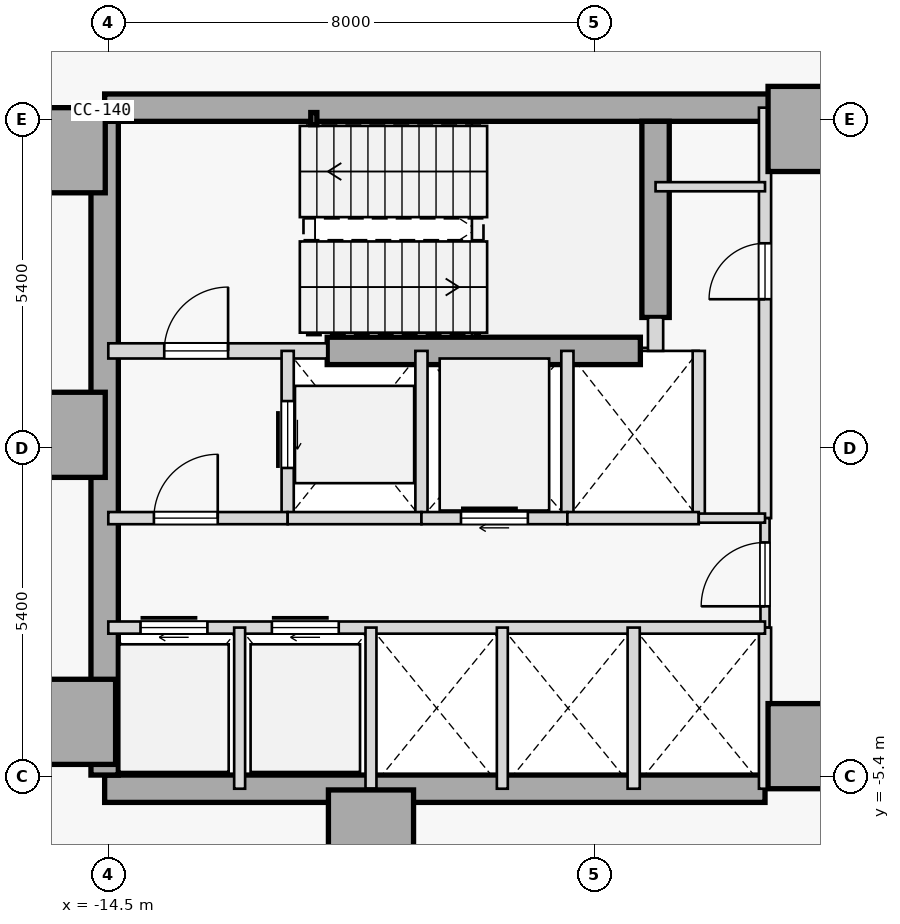
"""IFC4 building model, lengths in metres.
Left out: names, types, materials, properties, quantities, classifications, styles, units other than length and angle.
Written with IfcOpenShell. Run it as: python <this file> out.ifc"""

import sys

from ifc_helpers import new_model, si_unit, direction, frame, frame_2d, origin, origin_2d, place, context, subcontext, project, spatial, rectangle, hollow_rectangle, extrude, element, fill, save


model = new_model("IFC4")
c1 = context("Model", 3, precision=1e-05, world=origin(), true_north=direction((0.0, 1.0)))
c2 = subcontext(c1, "Body", "Model", "MODEL_VIEW")
j1 = project(units=[si_unit("LENGTHUNIT", "METRE"), si_unit("PLANEANGLEUNIT", "RADIAN")], contexts=[c1])
p1 = place(None, origin())
s1 = spatial("IfcSite", under=j1, at=p1, CompositionType="ELEMENT")
p2 = place(p1, origin())
s2 = spatial("IfcBuilding", under=s1, at=p2, CompositionType="ELEMENT")
p3 = place(p2, frame((0.0, 0.0, 71.2)))
s3 = spatial("IfcBuildingStorey", under=s2, at=p3, CompositionType="ELEMENT", Elevation=71.2)
for number, where, z_axis, x_axis in (
    (1, (-15.25, 4.9, 0.0), (0.0, 0.0, 1.0), (1.0, 0.0, 0.0)),
    (2, (-15.25, 0.22, 0.0), (0.0, 0.0, 1.0), (1.0, 0.0, 0.0)),
    (3, (-15.08, -4.5, 0.0), (0.0, 0.0, 1.0), (1.0, 0.0, 0.0)),
    (4, (-10.18, -6.32, 0.0), (0.0, 0.0, 1.0), (1.0, 0.0, 0.0)),
    (5, (-2.95, -4.9, 0.0), (0.0, 0.0, 1.0), (1.0, 0.0, 0.0)),
    (6, (-2.95, 5.25, 0.0), (0.0, 0.0, 1.0), (1.0, 0.0, 0.0)),
):
    element("IfcColumn", number, at=place(p3, frame(where, z_axis=z_axis, x_axis=x_axis)), inside=s3, PredefinedType="COLUMN", context=c2, shape_type="SweptSolid", body=[
        extrude(rectangle(XDim=1.4, YDim=1.4, at=origin_2d()), origin(), (0.0, 0.0, 1.0), 3.8),
    ])
p4 = place(p3, frame((-14.56, 5.6, 0.0), z_axis=(0.0, 0.0, 1.0), x_axis=(1.0, 0.0, 0.0)))
e7 = element("IfcWall", 7, at=p4, inside=s3, PredefinedType="SHEAR", context=c2, shape_type="SweptSolid", body=[
    extrude(rectangle(XDim=11.41, YDim=0.45, at=frame_2d((5.705, 0.0))), origin(), (0.0, 0.0, 1.0), 3.575),
])
p5 = place(p3, frame((-14.56, -5.6, 0.0), z_axis=(0.0, 0.0, 1.0), x_axis=(1.0, 0.0, 0.0)))
e8 = element("IfcWall", 8, at=p5, inside=s3, PredefinedType="SHEAR", context=c2, shape_type="SweptSolid", body=[
    extrude(rectangle(XDim=10.86, YDim=0.45, at=frame_2d((5.43, 0.0))), origin(), (0.0, 0.0, 1.0), 3.575),
])
p6 = place(p3, frame((-14.56, -5.375, 0.0), z_axis=(0.0, 0.0, 1.0), x_axis=(0.0, 1.0, 0.0)))
e9 = element("IfcWall", 9, at=p6, inside=s3, PredefinedType="SHEAR", context=c2, shape_type="SweptSolid", body=[
    extrude(rectangle(XDim=10.75, YDim=0.45, at=frame_2d((5.375, 0.0))), origin(), (0.0, 0.0, 1.0), 3.575),
])
p7 = place(p3, frame((-5.5, 2.15, 0.0), z_axis=(0.0, 0.0, 1.0), x_axis=(0.0, 1.0, 0.0)))
e10 = element("IfcWall", 10, at=p7, inside=s3, PredefinedType="SHEAR", context=c2, shape_type="SweptSolid", body=[
    extrude(rectangle(XDim=3.225, YDim=0.45, at=frame_2d((1.613, 0.0))), origin(), (0.0, 0.0, 1.0), 3.575),
])
p8 = place(p3, frame((-10.9, 1.6, 0.0), z_axis=(0.0, 0.0, 1.0), x_axis=(1.0, 0.0, 0.0)))
e11 = element("IfcWall", 11, at=p8, inside=s3, PredefinedType="SHEAR", context=c2, shape_type="SweptSolid", body=[
    extrude(rectangle(XDim=5.15, YDim=0.45, at=frame_2d((2.575, 0.0))), origin(), (0.0, 0.0, 1.0), 3.575),
])
p9 = place(p3, frame((-11.12, 5.42, 0.0), z_axis=(0.0, 0.0, 1.0), x_axis=(1.0, 0.0, 0.0)))
e12 = element("IfcColumn", 12, at=p9, inside=s3, PredefinedType="COLUMN", context=c2, shape_type="SweptSolid", body=[
    extrude(hollow_rectangle(XDim=0.1, YDim=0.2, WallThickness=0.008, at=origin_2d()), origin(), (0.0, 0.0, 1.0), 3.8),
])
p10 = place(p3, frame((-14.5, 1.6, 0.0), z_axis=(0.0, 0.0, 1.0), x_axis=(1.0, 0.0, 0.0)))
e13 = element("IfcWall", 13, at=p10, inside=s3, PredefinedType="STANDARD", context=c2, shape_type="SweptSolid", body=[
    extrude(rectangle(XDim=3.6, YDim=0.25, at=frame_2d((1.8, 0.0))), origin(), (0.0, 0.0, 1.0), 3.575),
])
p11 = place(p10, frame((0.92, 0.0, 0.0)))
e14 = element("IfcOpeningElement", 14, at=p11, cuts=e13, PredefinedType="OPENING", context=c2, shape_type="SweptSolid", body=[
    extrude(rectangle(XDim=1.05, YDim=2.15, at=frame_2d((0.525, 1.075))), frame((0.0, 0.135, 0.0), z_axis=(0.0, -1.0, 0.0), x_axis=(1.0, 0.0, 0.0)), (0.0, 0.0, 1.0), 0.27),
])
p12 = place(p3, frame((-5.5, 1.6, 0.0), z_axis=(0.0, 0.0, 1.0), x_axis=(0.0, 1.0, 0.0)))
e15 = element("IfcWall", 15, at=p12, inside=s3, PredefinedType="STANDARD", context=c2, shape_type="SweptSolid", body=[
    extrude(rectangle(XDim=0.55, YDim=0.25, at=frame_2d((0.275, 0.0))), origin(), (0.0, 0.0, 1.0), 3.575),
])
p13 = place(p3, frame((-3.7, -1.15, 0.0), z_axis=(0.0, 0.0, 1.0), x_axis=(0.0, 1.0, 0.0)))
e16 = element("IfcWall", 16, at=p13, inside=s3, PredefinedType="STANDARD", context=c2, shape_type="SweptSolid", body=[
    extrude(rectangle(XDim=6.75, YDim=0.2, at=frame_2d((3.375, 0.0))), origin(), (0.0, 0.0, 1.0), 3.575),
])
p14 = place(p13, frame((3.6, 0.0, 0.0)))
e17 = element("IfcOpeningElement", 17, at=p14, cuts=e16, PredefinedType="OPENING", context=c2, shape_type="SweptSolid", body=[
    extrude(rectangle(XDim=0.92, YDim=2.15, at=frame_2d((0.46, 1.075))), frame((0.0, 0.11, 0.0), z_axis=(0.0, -1.0, 0.0), x_axis=(1.0, 0.0, 0.0)), (0.0, 0.0, 1.0), 0.22),
])
p15 = place(p3, frame((-3.7, -2.95, 0.0), z_axis=(0.0, 0.0, 1.0), x_axis=(0.0, 1.0, 0.0)))
e18 = element("IfcWall", 18, at=p15, inside=s3, PredefinedType="PARTITIONING", context=c2, shape_type="SweptSolid", body=[
    extrude(rectangle(XDim=1.8, YDim=0.15, at=frame_2d((0.9, 0.0))), origin(), (0.0, 0.0, 1.0), 3.575),
])
p16 = place(p15, frame((0.35, 0.0, 0.0)))
e19 = element("IfcOpeningElement", 19, at=p16, cuts=e18, PredefinedType="OPENING", context=c2, shape_type="SweptSolid", body=[
    extrude(rectangle(XDim=1.05, YDim=2.18, at=frame_2d((0.525, 1.09))), frame((0.0, 0.085, 0.0), z_axis=(0.0, -1.0, 0.0), x_axis=(1.0, 0.0, 0.0)), (0.0, 0.0, 1.0), 0.17),
])
p17 = place(p3, frame((-3.7, -5.6, 0.0), z_axis=(0.0, 0.0, 1.0), x_axis=(0.0, 1.0, 0.0)))
e20 = element("IfcWall", 20, at=p17, inside=s3, PredefinedType="STANDARD", context=c2, shape_type="SweptSolid", body=[
    extrude(rectangle(XDim=2.65, YDim=0.2, at=frame_2d((1.325, 0.0))), origin(), (0.0, 0.0, 1.0), 3.575),
])
p18 = place(p3, frame((-11.55, -1.15, 0.0), z_axis=(0.0, 0.0, 1.0), x_axis=(0.0, 1.0, 0.0)))
e21 = element("IfcWall", 21, at=p18, inside=s3, PredefinedType="STANDARD", context=c2, shape_type="SweptSolid", body=[
    extrude(rectangle(XDim=2.75, YDim=0.2, at=frame_2d((1.375, 0.0))), origin(), (0.0, 0.0, 1.0), 3.575),
])
p19 = place(p18, frame((0.825, 0.0, 0.0)))
e22 = element("IfcOpeningElement", 22, at=p19, cuts=e21, PredefinedType="OPENING", context=c2, shape_type="SweptSolid", body=[
    extrude(rectangle(XDim=1.1, YDim=2.15, at=frame_2d((0.55, 1.075))), frame((0.0, 0.11, 0.0), z_axis=(0.0, -1.0, 0.0), x_axis=(1.0, 0.0, 0.0)), (0.0, 0.0, 1.0), 0.22),
])
p20 = place(p3, frame((-9.35, -1.15, 0.0), z_axis=(0.0, 0.0, 1.0), x_axis=(0.0, 1.0, 0.0)))
e23 = element("IfcWall", 23, at=p20, inside=s3, PredefinedType="STANDARD", context=c2, shape_type="SweptSolid", body=[
    extrude(rectangle(XDim=2.75, YDim=0.2, at=frame_2d((1.375, 0.0))), origin(), (0.0, 0.0, 1.0), 3.575),
])
p21 = place(p3, frame((-14.5, -1.15, 0.0), z_axis=(0.0, 0.0, 1.0), x_axis=(1.0, 0.0, 0.0)))
e24 = element("IfcWall", 24, at=p21, inside=s3, PredefinedType="STANDARD", context=c2, shape_type="SweptSolid", body=[
    extrude(rectangle(XDim=2.95, YDim=0.2, at=frame_2d((1.475, 0.0))), origin(), (0.0, 0.0, 1.0), 3.575),
])
p22 = place(p21, frame((0.75, 0.0, 0.0)))
e25 = element("IfcOpeningElement", 25, at=p22, cuts=e24, PredefinedType="OPENING", context=c2, shape_type="SweptSolid", body=[
    extrude(rectangle(XDim=1.05, YDim=2.18, at=frame_2d((0.525, 1.09))), frame((0.0, 0.11, 0.0), z_axis=(0.0, -1.0, 0.0), x_axis=(1.0, 0.0, 0.0)), (0.0, 0.0, 1.0), 0.22),
])
p23 = place(p3, frame((-11.55, -1.15, 0.0), z_axis=(0.0, 0.0, 1.0), x_axis=(1.0, 0.0, 0.0)))
e26 = element("IfcWall", 26, at=p23, inside=s3, PredefinedType="STANDARD", context=c2, shape_type="SweptSolid", body=[
    extrude(rectangle(XDim=2.2, YDim=0.2, at=frame_2d((1.1, 0.0))), origin(), (0.0, 0.0, 1.0), 3.575),
])
p24 = place(p3, frame((-6.95, -1.15, 0.0), z_axis=(0.0, 0.0, 1.0), x_axis=(0.0, 1.0, 0.0)))
e27 = element("IfcWall", 27, at=p24, inside=s3, PredefinedType="STANDARD", context=c2, shape_type="SweptSolid", body=[
    extrude(rectangle(XDim=2.75, YDim=0.2, at=frame_2d((1.375, 0.0))), origin(), (0.0, 0.0, 1.0), 3.575),
])
p25 = place(p3, frame((-9.35, -1.15, 0.0), z_axis=(0.0, 0.0, 1.0), x_axis=(1.0, 0.0, 0.0)))
e28 = element("IfcWall", 28, at=p25, inside=s3, PredefinedType="STANDARD", context=c2, shape_type="SweptSolid", body=[
    extrude(rectangle(XDim=2.4, YDim=0.2, at=frame_2d((1.2, 0.0))), origin(), (0.0, 0.0, 1.0), 3.575),
])
p26 = place(p25, frame((0.65, 0.0, 0.0)))
e29 = element("IfcOpeningElement", 29, at=p26, cuts=e28, PredefinedType="OPENING", context=c2, shape_type="SweptSolid", body=[
    extrude(rectangle(XDim=1.1, YDim=2.15, at=frame_2d((0.55, 1.075))), frame((0.0, 0.11, 0.0), z_axis=(0.0, -1.0, 0.0), x_axis=(1.0, 0.0, 0.0)), (0.0, 0.0, 1.0), 0.22),
])
p27 = place(p3, frame((-4.79, -1.15, 0.0), z_axis=(0.0, 0.0, 1.0), x_axis=(0.0, 1.0, 0.0)))
e30 = element("IfcWall", 30, at=p27, inside=s3, PredefinedType="STANDARD", context=c2, shape_type="SweptSolid", body=[
    extrude(rectangle(XDim=2.75, YDim=0.2, at=frame_2d((1.375, 0.0))), origin(), (0.0, 0.0, 1.0), 3.575),
])
p28 = place(p3, frame((-6.95, -1.15, 0.0), z_axis=(0.0, 0.0, 1.0), x_axis=(1.0, 0.0, 0.0)))
e31 = element("IfcWall", 31, at=p28, inside=s3, PredefinedType="STANDARD", context=c2, shape_type="SweptSolid", body=[
    extrude(rectangle(XDim=2.16, YDim=0.2, at=frame_2d((1.08, 0.0))), origin(), (0.0, 0.0, 1.0), 3.575),
])
p29 = place(p3, frame((-4.79, -1.15, 0.0), z_axis=(0.0, 0.0, 1.0), x_axis=(1.0, 0.0, 0.0)))
e32 = element("IfcWall", 32, at=p29, inside=s3, PredefinedType="PARTITIONING", context=c2, shape_type="SweptSolid", body=[
    extrude(rectangle(XDim=1.09, YDim=0.15, at=frame_2d((0.545, 0.0))), origin(), (0.0, 0.0, 1.0), 3.575),
])
p30 = place(p3, frame((-14.5, -2.95, 0.0), z_axis=(0.0, 0.0, 1.0), x_axis=(1.0, 0.0, 0.0)))
e33 = element("IfcWall", 33, at=p30, inside=s3, PredefinedType="STANDARD", context=c2, shape_type="SweptSolid", body=[
    extrude(rectangle(XDim=10.8, YDim=0.2, at=frame_2d((5.4, 0.0))), origin(), (0.0, 0.0, 1.0), 3.575),
])
p31 = place(p30, frame((0.53, 0.0, 0.0)))
e34 = element("IfcOpeningElement", 34, at=p31, cuts=e33, PredefinedType="OPENING", context=c2, shape_type="SweptSolid", body=[
    extrude(rectangle(XDim=1.1, YDim=2.15, at=frame_2d((0.55, 1.075))), frame((0.0, 0.11, 0.0), z_axis=(0.0, -1.0, 0.0), x_axis=(1.0, 0.0, 0.0)), (0.0, 0.0, 1.0), 0.22),
])
p32 = place(p30, frame((2.69, 0.0, 0.0)))
e35 = element("IfcOpeningElement", 35, at=p32, cuts=e33, PredefinedType="OPENING", context=c2, shape_type="SweptSolid", body=[
    extrude(rectangle(XDim=1.1, YDim=2.15, at=frame_2d((0.55, 1.075))), frame((0.0, 0.11, 0.0), z_axis=(0.0, -1.0, 0.0), x_axis=(1.0, 0.0, 0.0)), (0.0, 0.0, 1.0), 0.22),
])
p33 = place(p3, frame((-5.86, -5.6, 0.0), z_axis=(0.0, 0.0, 1.0), x_axis=(0.0, 1.0, 0.0)))
e36 = element("IfcWall", 36, at=p33, inside=s3, PredefinedType="STANDARD", context=c2, shape_type="SweptSolid", body=[
    extrude(rectangle(XDim=2.65, YDim=0.2, at=frame_2d((1.325, 0.0))), origin(), (0.0, 0.0, 1.0), 3.575),
])
for number, where, z_axis, x_axis in (
    (37, (-12.34, -5.6, 0.0), (0.0, 0.0, 1.0), (0.0, 1.0, 0.0)),
    (38, (-10.18, -5.6, 0.0), (0.0, 0.0, 1.0), (0.0, 1.0, 0.0)),
    (39, (-8.02, -5.6, 0.0), (0.0, 0.0, 1.0), (0.0, 1.0, 0.0)),
):
    element("IfcWall", number, at=place(p3, frame(where, z_axis=z_axis, x_axis=x_axis)), inside=s3, PredefinedType="STANDARD", context=c2, shape_type="SweptSolid", body=[
        extrude(rectangle(XDim=2.65, YDim=0.18, at=frame_2d((1.325, 0.0))), origin(), (0.0, 0.0, 1.0), 3.575),
    ])
p34 = place(p3, frame((-5.5, 4.3, 0.0), z_axis=(0.0, 0.0, 1.0), x_axis=(1.0, 0.0, 0.0)))
e40 = element("IfcWall", 40, at=p34, inside=s3, PredefinedType="PARTITIONING", context=c2, shape_type="SweptSolid", body=[
    extrude(rectangle(XDim=1.8, YDim=0.15, at=frame_2d((0.9, 0.0))), origin(), (0.0, 0.0, 1.0), 3.575),
])
p35 = place(p11, origin())
e41 = element("IfcDoor", 41, at=p35, inside=s3, OperationType="SINGLE_SWING_RIGHT", PredefinedType="DOOR", context=c2, shape_type="SweptSolid", body=[
    extrude(rectangle(XDim=1.05, YDim=2.15, at=frame_2d((0.525, 1.075))), frame((0.0, 0.025, 0.0), z_axis=(0.0, -1.0, 0.0), x_axis=(1.0, 0.0, 0.0)), (0.0, 0.0, 1.0), 0.05),
])
fill(e14, e41)
p36 = place(p22, origin())
e42 = element("IfcDoor", 42, at=p36, inside=s3, OperationType="SINGLE_SWING_RIGHT", PredefinedType="DOOR", context=c2, shape_type="SweptSolid", body=[
    extrude(rectangle(XDim=1.05, YDim=2.18, at=frame_2d((0.525, 1.09))), frame((0.0, 0.025, 0.0), z_axis=(0.0, -1.0, 0.0), x_axis=(1.0, 0.0, 0.0)), (0.0, 0.0, 1.0), 0.05),
])
fill(e25, e42)
p37 = place(p16, origin())
e43 = element("IfcDoor", 43, at=p37, inside=s3, OperationType="SINGLE_SWING_LEFT", PredefinedType="DOOR", context=c2, shape_type="SweptSolid", body=[
    extrude(rectangle(XDim=1.05, YDim=2.18, at=frame_2d((0.525, 1.09))), frame((0.0, 0.025, 0.0), z_axis=(0.0, -1.0, 0.0), x_axis=(1.0, 0.0, 0.0)), (0.0, 0.0, 1.0), 0.05),
])
fill(e19, e43)
p38 = place(p19, origin())
e44 = element("IfcDoor", 44, at=p38, inside=s3, OperationType="SLIDING_TO_RIGHT", PredefinedType="DOOR", context=c2, shape_type="SweptSolid", body=[
    extrude(rectangle(XDim=1.1, YDim=2.15, at=frame_2d((0.55, 1.075))), frame((0.0, 0.025, 0.0), z_axis=(0.0, -1.0, 0.0), x_axis=(1.0, 0.0, 0.0)), (0.0, 0.0, 1.0), 0.05),
])
fill(e22, e44)
p39 = place(p26, origin())
e45 = element("IfcDoor", 45, at=p39, inside=s3, OperationType="SLIDING_TO_RIGHT", PredefinedType="DOOR", context=c2, shape_type="SweptSolid", body=[
    extrude(rectangle(XDim=1.1, YDim=2.15, at=frame_2d((0.55, 1.075))), frame((0.0, 0.025, 0.0), z_axis=(0.0, -1.0, 0.0), x_axis=(1.0, 0.0, 0.0)), (0.0, 0.0, 1.0), 0.05),
])
fill(e29, e45)
p40 = place(p31, origin())
e46 = element("IfcDoor", 46, at=p40, inside=s3, OperationType="SLIDING_TO_RIGHT", PredefinedType="DOOR", context=c2, shape_type="SweptSolid", body=[
    extrude(rectangle(XDim=1.1, YDim=2.15, at=frame_2d((0.55, 1.075))), frame((0.0, 0.025, 0.0), z_axis=(0.0, -1.0, 0.0), x_axis=(1.0, 0.0, 0.0)), (0.0, 0.0, 1.0), 0.05),
])
fill(e34, e46)
p41 = place(p32, origin())
e47 = element("IfcDoor", 47, at=p41, inside=s3, OperationType="SLIDING_TO_RIGHT", PredefinedType="DOOR", context=c2, shape_type="SweptSolid", body=[
    extrude(rectangle(XDim=1.1, YDim=2.15, at=frame_2d((0.55, 1.075))), frame((0.0, 0.025, 0.0), z_axis=(0.0, -1.0, 0.0), x_axis=(1.0, 0.0, 0.0)), (0.0, 0.0, 1.0), 0.05),
])
fill(e35, e47)
p42 = place(p14, origin())
e48 = element("IfcDoor", 48, at=p42, inside=s3, OperationType="SINGLE_SWING_LEFT", PredefinedType="DOOR", context=c2, shape_type="SweptSolid", body=[
    extrude(rectangle(XDim=0.92, YDim=2.15, at=frame_2d((0.46, 1.075))), frame((0.0, 0.025, 0.0), z_axis=(0.0, -1.0, 0.0), x_axis=(1.0, 0.0, 0.0)), (0.0, 0.0, 1.0), 0.05),
])
fill(e17, e48)
save(model, sys.argv[1])
